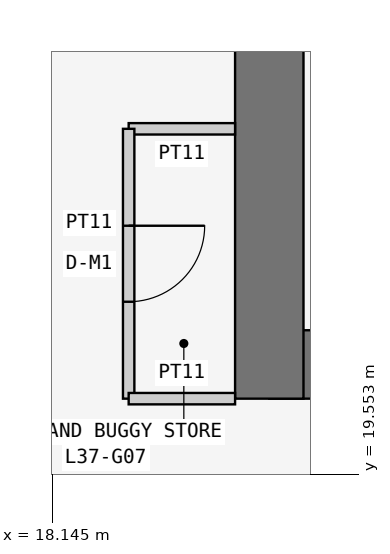
"""IFC4 building model, lengths in metres.
Left out: names, types, materials, properties, quantities, classifications, styles, units other than length and angle.
Written with IfcOpenShell. Run it as: python <this file> out.ifc"""

import sys

from ifc_helpers import new_model, si_unit, direction, frame, frame_2d, origin, place, context, subcontext, project, spatial, rectangle, extrude, element, fill, save


model = new_model("IFC4")
c1 = context("Model", 3, precision=1e-05, world=origin(), true_north=direction((0.0, 1.0)))
c2 = subcontext(c1, "Body", "Model", "MODEL_VIEW")
j1 = project(units=[si_unit("LENGTHUNIT", "METRE"), si_unit("PLANEANGLEUNIT", "RADIAN")], contexts=[c1])
p1 = place(None, origin())
s1 = spatial("IfcSite", under=j1, at=p1, CompositionType="ELEMENT")
p2 = place(p1, origin())
s2 = spatial("IfcBuilding", under=s1, at=p2, CompositionType="ELEMENT")
p3 = place(p2, frame((0.0, 0.0, 144.9)))
s3 = spatial("IfcBuildingStorey", under=s2, at=p3, CompositionType="ELEMENT", Elevation=144.9)
p4 = place(p3, frame((21.0, 21.0, 0.0), z_axis=(0.0, 0.0, 1.0), x_axis=(1.0, 0.0, 0.0)))
e1 = element("IfcWall", 1, at=p4, inside=s3, PredefinedType="SHEAR", context=c2, shape_type="SweptSolid", body=[
    extrude(rectangle(XDim=17.25, YDim=0.9, at=frame_2d((8.625, 0.0))), origin(), (0.0, 0.0, 1.0), 3.6),
])
p5 = place(p3, frame((21.0, 37.8, 0.0), z_axis=(0.0, 0.0, 1.0), x_axis=(0.0, -1.0, 0.0)))
e2 = element("IfcWall", 2, at=p5, inside=s3, PredefinedType="SHEAR", context=c2, shape_type="SweptSolid", body=[
    extrude(rectangle(XDim=17.25, YDim=0.9, at=frame_2d((8.625, 0.0))), origin(), (0.0, 0.0, 1.0), 3.6),
])
p6 = place(p5, frame((5.4, 0.0, 0.0)))
e3 = element("IfcOpeningElement", 3, at=p6, cuts=e2, PredefinedType="OPENING", context=c2, shape_type="SweptSolid", body=[
    extrude(rectangle(XDim=1.2, YDim=2.1, at=frame_2d((0.6, 1.05))), frame((0.0, 0.46, 0.0), z_axis=(0.0, -1.0, 0.0), x_axis=(1.0, 0.0, 0.0)), (0.0, 0.0, 1.0), 0.92),
])
p7 = place(p3, frame((20.55, 24.1, 0.0), z_axis=(0.0, 0.0, 1.0), x_axis=(-1.0, 0.0, 0.0)))
e4 = element("IfcWall", 4, at=p7, inside=s3, PredefinedType="PARTITIONING", context=c2, shape_type="SweptSolid", body=[
    extrude(rectangle(XDim=1.4, YDim=0.15, at=frame_2d((0.7, 0.0))), origin(), (0.0, 0.0, 1.0), 3.45),
])
p8 = place(p3, frame((19.15, 24.1, 0.0), z_axis=(0.0, 0.0, 1.0), x_axis=(0.0, -1.0, 0.0)))
e5 = element("IfcWall", 5, at=p8, inside=s3, PredefinedType="PARTITIONING", context=c2, shape_type="SweptSolid", body=[
    extrude(rectangle(XDim=3.55, YDim=0.15, at=frame_2d((1.775, 0.0))), origin(), (0.0, 0.0, 1.0), 3.45),
])
p9 = place(p8, frame((1.275, 0.0, 0.0)))
e6 = element("IfcOpeningElement", 6, at=p9, cuts=e5, PredefinedType="OPENING", context=c2, shape_type="SweptSolid", body=[
    extrude(rectangle(XDim=1.0, YDim=2.1, at=frame_2d((0.5, 1.05))), frame((0.0, 0.085, 0.0), z_axis=(0.0, -1.0, 0.0), x_axis=(1.0, 0.0, 0.0)), (0.0, 0.0, 1.0), 0.17),
])
p10 = place(p3, frame((19.15, 20.55, 0.0), z_axis=(0.0, 0.0, 1.0), x_axis=(1.0, 0.0, 0.0)))
e7 = element("IfcWall", 7, at=p10, inside=s3, PredefinedType="PARTITIONING", context=c2, shape_type="SweptSolid", body=[
    extrude(rectangle(XDim=1.4, YDim=0.15, at=frame_2d((0.7, 0.0))), origin(), (0.0, 0.0, 1.0), 3.45),
])
p11 = place(p9, origin())
e8 = element("IfcDoor", 8, at=p11, inside=s3, OperationType="SINGLE_SWING_LEFT", PredefinedType="DOOR", context=c2, shape_type="SweptSolid", body=[
    extrude(rectangle(XDim=1.0, YDim=2.1, at=frame_2d((0.5, 1.05))), frame((0.0, 0.025, 0.0), z_axis=(0.0, -1.0, 0.0), x_axis=(1.0, 0.0, 0.0)), (0.0, 0.0, 1.0), 0.05),
])
fill(e6, e8)
save(model, sys.argv[1])
